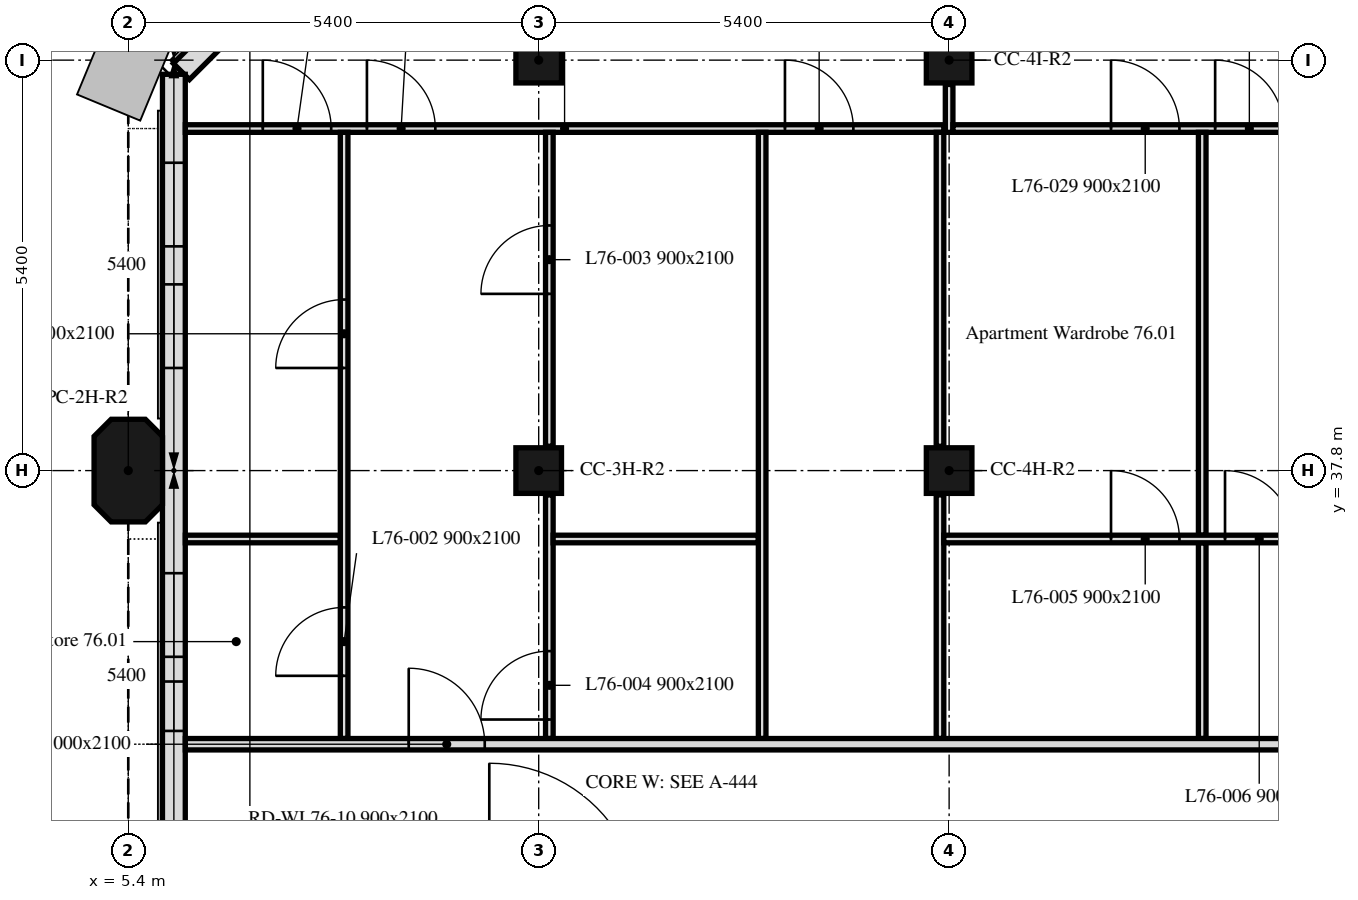
"""IFC4 building model, lengths in metres.
Left out: names, types, materials, properties, quantities, classifications, styles, units other than length and angle.
Written with IfcOpenShell. Run it as: python <this file> out.ifc"""

import sys

from ifc_helpers import new_model, si_unit, direction, frame, frame_2d, origin, origin_2d, place, context, subcontext, project, spatial, polyline, rectangle, outline, extrude, element, fill, save


model = new_model("IFC4")
c1 = context("Model", 3, precision=1e-05, world=origin(), true_north=direction((0.0, 1.0)))
c2 = subcontext(c1, "Body", "Model", "MODEL_VIEW")
j1 = project(units=[si_unit("LENGTHUNIT", "METRE"), si_unit("PLANEANGLEUNIT", "RADIAN")], contexts=[c1])
p1 = place(None, origin())
s1 = spatial("IfcSite", under=j1, at=p1, CompositionType="ELEMENT")
p2 = place(p1, origin())
s2 = spatial("IfcBuilding", under=s1, at=p2, CompositionType="ELEMENT")
p3 = place(p2, frame((0.0, 0.0, 304.9)))
s3 = spatial("IfcBuildingStorey", under=s2, at=p3, CompositionType="ELEMENT", Elevation=304.9)
p4 = place(p3, frame((5.4, 37.8, 0.0), z_axis=(0.0, 0.0, 1.0), x_axis=(0.0, 1.0, 0.0)))
e1 = element("IfcColumn", 1, at=p4, inside=s3, PredefinedType="COLUMN", context=c2, shape_type="SweptSolid", body=[
    extrude(outline(polyline([(-0.45, -0.45), (0.45, -0.45), (0.675, -0.225), (0.675, 0.225), (0.45, 0.45), (-0.45, 0.45), (-0.675, 0.225), (-0.675, -0.225), (-0.45, -0.45)])), origin(), (0.0, 0.0, 1.0), 2.8),
])
for number, where, z_axis, x_axis in (
    (2, (10.8, 37.8, 0.0), (0.0, 0.0, 1.0), (1.0, 0.0, 0.0)),
    (3, (16.2, 37.8, 0.0), (0.0, 0.0, 1.0), (1.0, 0.0, 0.0)),
    (4, (10.8, 43.2, 0.0), (0.0, 0.0, 1.0), (1.0, 0.0, 0.0)),
    (5, (16.2, 43.2, 0.0), (0.0, 0.0, 1.0), (1.0, 0.0, 0.0)),
):
    element("IfcColumn", number, at=place(p3, frame(where, z_axis=z_axis, x_axis=x_axis)), inside=s3, PredefinedType="COLUMN", context=c2, shape_type="SweptSolid", body=[
        extrude(rectangle(XDim=0.6, YDim=0.6, at=origin_2d()), origin(), (0.0, 0.0, 1.0), 2.8),
    ])
p5 = place(p3, frame((10.949, 47.901, 0.0), z_axis=(0.0, 0.0, 1.0), x_axis=(-0.707106781187, -0.707106781187, 0.0)))
e6 = element("IfcWall", 6, at=p5, inside=s3, PredefinedType="SOLIDWALL", context=c2, shape_type="SweptSolid", body=[
    extrude(rectangle(XDim=6.86, YDim=0.3, at=frame_2d((3.43, 0.0))), origin(), (0.0, 0.0, 1.0), 2.8),
])
p6 = place(p5, frame((1.28, 0.0, 0.9)))
e7 = element("IfcOpeningElement", 7, at=p6, cuts=e6, PredefinedType="OPENING", context=c2, shape_type="SweptSolid", body=[
    extrude(rectangle(XDim=1.1, YDim=1.7, at=frame_2d((0.55, 0.85))), frame((0.0, 0.16, 0.0), z_axis=(0.0, -1.0, 0.0), x_axis=(1.0, 0.0, 0.0)), (0.0, 0.0, 1.0), 0.32),
])
p7 = place(p5, frame((4.48, 0.0, 0.9)))
e8 = element("IfcOpeningElement", 8, at=p7, cuts=e6, PredefinedType="OPENING", context=c2, shape_type="SweptSolid", body=[
    extrude(rectangle(XDim=1.1, YDim=1.7, at=frame_2d((0.55, 0.85))), frame((0.0, 0.16, 0.0), z_axis=(0.0, -1.0, 0.0), x_axis=(1.0, 0.0, 0.0)), (0.0, 0.0, 1.0), 0.32),
])
p8 = place(p3, frame((6.0, 43.014, 0.0), z_axis=(0.0, 0.0, 1.0), x_axis=(0.0, -1.0, 0.0)))
e9 = element("IfcWall", 9, at=p8, inside=s3, PredefinedType="SOLIDWALL", context=c2, shape_type="SweptSolid", body=[
    extrude(rectangle(XDim=10.614, YDim=0.3, at=frame_2d((5.307, 0.0))), origin(), (0.0, 0.0, 1.0), 2.8),
])
p9 = place(p8, frame((1.164, 0.0, 0.9)))
e10 = element("IfcOpeningElement", 10, at=p9, cuts=e9, PredefinedType="OPENING", context=c2, shape_type="SweptSolid", body=[
    extrude(rectangle(XDim=1.1, YDim=1.7, at=frame_2d((0.55, 0.85))), frame((0.0, 0.16, 0.0), z_axis=(0.0, -1.0, 0.0), x_axis=(1.0, 0.0, 0.0)), (0.0, 0.0, 1.0), 0.32),
])
p10 = place(p8, frame((2.764, 0.0, 0.9)))
e11 = element("IfcOpeningElement", 11, at=p10, cuts=e9, PredefinedType="OPENING", context=c2, shape_type="SweptSolid", body=[
    extrude(rectangle(XDim=1.1, YDim=1.7, at=frame_2d((0.55, 0.85))), frame((0.0, 0.16, 0.0), z_axis=(0.0, -1.0, 0.0), x_axis=(1.0, 0.0, 0.0)), (0.0, 0.0, 1.0), 0.32),
])
p11 = place(p8, frame((6.564, 0.0, 0.9)))
e12 = element("IfcOpeningElement", 12, at=p11, cuts=e9, PredefinedType="OPENING", context=c2, shape_type="SweptSolid", body=[
    extrude(rectangle(XDim=1.1, YDim=1.7, at=frame_2d((0.55, 0.85))), frame((0.0, 0.16, 0.0), z_axis=(0.0, -1.0, 0.0), x_axis=(1.0, 0.0, 0.0)), (0.0, 0.0, 1.0), 0.32),
])
p12 = place(p8, frame((7.989, 0.0, 0.9)))
e13 = element("IfcOpeningElement", 13, at=p12, cuts=e9, PredefinedType="OPENING", context=c2, shape_type="SweptSolid", body=[
    extrude(rectangle(XDim=0.65, YDim=1.7, at=frame_2d((0.325, 0.85))), frame((0.0, 0.16, 0.0), z_axis=(0.0, -1.0, 0.0), x_axis=(1.0, 0.0, 0.0)), (0.0, 0.0, 1.0), 0.32),
])
p13 = place(p3, frame((6.151, 42.3, 0.0), z_axis=(0.0, 0.0, 1.0), x_axis=(1.0, 0.0, 0.0)))
e14 = element("IfcWall", 14, at=p13, inside=s3, PredefinedType="PARTITIONING", context=c2, shape_type="SweptSolid", body=[
    extrude(rectangle(XDim=9.979, YDim=0.1, at=frame_2d((4.99, 0.0))), origin(), (0.0, 0.0, 1.0), 2.2),
])
p14 = place(p13, frame((7.889, 0.0, 0.0)))
e15 = element("IfcOpeningElement", 15, at=p14, cuts=e14, PredefinedType="OPENING", context=c2, shape_type="SweptSolid", body=[
    extrude(rectangle(XDim=0.9, YDim=2.1, at=frame_2d((0.45, 1.05))), frame((0.0, 0.05, 0.0), z_axis=(0.0, -1.0, 0.0), x_axis=(1.0, 0.0, 0.0)), (0.0, 0.0, 1.0), 0.1),
])
p15 = place(p13, frame((1.019, 0.0, 0.0)))
e16 = element("IfcOpeningElement", 16, at=p15, cuts=e14, PredefinedType="OPENING", context=c2, shape_type="SweptSolid", body=[
    extrude(rectangle(XDim=0.9, YDim=2.1, at=frame_2d((0.45, 1.05))), frame((0.0, 0.05, 0.0), z_axis=(0.0, -1.0, 0.0), x_axis=(1.0, 0.0, 0.0)), (0.0, 0.0, 1.0), 0.1),
])
p16 = place(p13, frame((2.389, 0.0, 0.0)))
e17 = element("IfcOpeningElement", 17, at=p16, cuts=e14, PredefinedType="OPENING", context=c2, shape_type="SweptSolid", body=[
    extrude(rectangle(XDim=0.9, YDim=2.1, at=frame_2d((0.45, 1.05))), frame((0.0, 0.05, 0.0), z_axis=(0.0, -1.0, 0.0), x_axis=(1.0, 0.0, 0.0)), (0.0, 0.0, 1.0), 0.1),
])
p17 = place(p3, frame((16.2, 42.25, 0.0), z_axis=(0.0, 0.0, 1.0), x_axis=(0.0, 1.0, 0.0)))
e18 = element("IfcWall", 18, at=p17, inside=s3, PredefinedType="PARTITIONING", context=c2, shape_type="SweptSolid", body=[
    extrude(rectangle(XDim=0.63, YDim=0.1, at=frame_2d((0.315, 0.0))), origin(), (0.0, 0.0, 1.0), 2.2),
])
p18 = place(p3, frame((16.25, 42.3, 0.0), z_axis=(0.0, 0.0, 1.0), x_axis=(1.0, 0.0, 0.0)))
e19 = element("IfcWall", 19, at=p18, inside=s3, PredefinedType="PARTITIONING", context=c2, shape_type="SweptSolid", body=[
    extrude(rectangle(XDim=5.275, YDim=0.1, at=frame_2d((2.637, 0.0))), origin(), (0.0, 0.0, 1.0), 2.8),
])
p19 = place(p18, frame((2.08, 0.0, 0.0)))
e20 = element("IfcOpeningElement", 20, at=p19, cuts=e19, PredefinedType="OPENING", context=c2, shape_type="SweptSolid", body=[
    extrude(rectangle(XDim=0.9, YDim=2.1, at=frame_2d((0.45, 1.05))), frame((0.0, 0.05, 0.0), z_axis=(0.0, -1.0, 0.0), x_axis=(1.0, 0.0, 0.0)), (0.0, 0.0, 1.0), 0.1),
])
p20 = place(p18, frame((3.45, 0.0, 0.0)))
e21 = element("IfcOpeningElement", 21, at=p20, cuts=e19, PredefinedType="OPENING", context=c2, shape_type="SweptSolid", body=[
    extrude(rectangle(XDim=0.9, YDim=2.1, at=frame_2d((0.45, 1.05))), frame((0.0, 0.05, 0.0), z_axis=(0.0, -1.0, 0.0), x_axis=(1.0, 0.0, 0.0)), (0.0, 0.0, 1.0), 0.1),
])
p21 = place(p3, frame((6.151, 36.9, 0.0), z_axis=(0.0, 0.0, 1.0), x_axis=(1.0, 0.0, 0.0)))
e22 = element("IfcWall", 22, at=p21, inside=s3, PredefinedType="PARTITIONING", context=c2, shape_type="SweptSolid", body=[
    extrude(rectangle(XDim=2.039, YDim=0.1, at=frame_2d((1.02, 0.0))), origin(), (0.0, 0.0, 1.0), 2.8),
])
p22 = place(p3, frame((8.24, 34.275, 0.0), z_axis=(0.0, 0.0, 1.0), x_axis=(0.0, 1.0, 0.0)))
e23 = element("IfcWall", 23, at=p22, inside=s3, PredefinedType="PARTITIONING", context=c2, shape_type="SweptSolid", body=[
    extrude(rectangle(XDim=7.975, YDim=0.1, at=frame_2d((3.988, 0.0))), origin(), (0.0, 0.0, 1.0), 2.2),
])
p23 = place(p22, frame((0.825, 0.0, 0.0)))
e24 = element("IfcOpeningElement", 24, at=p23, cuts=e23, PredefinedType="OPENING", context=c2, shape_type="SweptSolid", body=[
    extrude(rectangle(XDim=0.9, YDim=2.1, at=frame_2d((0.45, 1.05))), frame((0.0, 0.05, 0.0), z_axis=(0.0, -1.0, 0.0), x_axis=(1.0, 0.0, 0.0)), (0.0, 0.0, 1.0), 0.1),
])
p24 = place(p22, frame((4.875, 0.0, 0.0)))
e25 = element("IfcOpeningElement", 25, at=p24, cuts=e23, PredefinedType="OPENING", context=c2, shape_type="SweptSolid", body=[
    extrude(rectangle(XDim=0.9, YDim=2.1, at=frame_2d((0.45, 1.05))), frame((0.0, 0.05, 0.0), z_axis=(0.0, -1.0, 0.0), x_axis=(1.0, 0.0, 0.0)), (0.0, 0.0, 1.0), 0.1),
])
p25 = place(p3, frame((10.94, 34.275, 0.0), z_axis=(0.0, 0.0, 1.0), x_axis=(0.0, 1.0, 0.0)))
e26 = element("IfcWall", 26, at=p25, inside=s3, PredefinedType="PARTITIONING", context=c2, shape_type="SweptSolid", body=[
    extrude(rectangle(XDim=3.205, YDim=0.1, at=frame_2d((1.603, 0.0))), origin(), (0.0, 0.0, 1.0), 2.2),
])
p26 = place(p25, frame((0.25, 0.0, 0.0)))
e27 = element("IfcOpeningElement", 27, at=p26, cuts=e26, PredefinedType="OPENING", context=c2, shape_type="SweptSolid", body=[
    extrude(rectangle(XDim=0.9, YDim=2.1, at=frame_2d((0.45, 1.05))), frame((0.0, 0.05, 0.0), z_axis=(0.0, -1.0, 0.0), x_axis=(1.0, 0.0, 0.0)), (0.0, 0.0, 1.0), 0.1),
])
p27 = place(p3, frame((10.94, 38.12, 0.0), z_axis=(0.0, 0.0, 1.0), x_axis=(0.0, 1.0, 0.0)))
e28 = element("IfcWall", 28, at=p27, inside=s3, PredefinedType="PARTITIONING", context=c2, shape_type="SweptSolid", body=[
    extrude(rectangle(XDim=4.13, YDim=0.1, at=frame_2d((2.065, 0.0))), origin(), (0.0, 0.0, 1.0), 2.2),
])
p28 = place(p27, frame((2.005, 0.0, 0.0)))
e29 = element("IfcOpeningElement", 29, at=p28, cuts=e28, PredefinedType="OPENING", context=c2, shape_type="SweptSolid", body=[
    extrude(rectangle(XDim=0.9, YDim=2.1, at=frame_2d((0.45, 1.05))), frame((0.0, 0.05, 0.0), z_axis=(0.0, -1.0, 0.0), x_axis=(1.0, 0.0, 0.0)), (0.0, 0.0, 1.0), 0.1),
])
p29 = place(p3, frame((10.99, 36.9, 0.0), z_axis=(0.0, 0.0, 1.0), x_axis=(1.0, 0.0, 0.0)))
e30 = element("IfcWall", 30, at=p29, inside=s3, PredefinedType="PARTITIONING", context=c2, shape_type="SweptSolid", body=[
    extrude(rectangle(XDim=2.7, YDim=0.1, at=frame_2d((1.35, 0.0))), origin(), (0.0, 0.0, 1.0), 2.8),
])
p30 = place(p3, frame((13.74, 34.275, 0.0), z_axis=(0.0, 0.0, 1.0), x_axis=(0.0, 1.0, 0.0)))
e31 = element("IfcWall", 31, at=p30, inside=s3, PredefinedType="PARTITIONING", context=c2, shape_type="SweptSolid", body=[
    extrude(rectangle(XDim=7.975, YDim=0.1, at=frame_2d((3.988, 0.0))), origin(), (0.0, 0.0, 1.0), 2.2),
])
p31 = place(p3, frame((16.08, 34.275, 0.0), z_axis=(0.0, 0.0, 1.0), x_axis=(0.0, 1.0, 0.0)))
e32 = element("IfcWall", 32, at=p31, inside=s3, PredefinedType="PARTITIONING", context=c2, shape_type="SweptSolid", body=[
    extrude(rectangle(XDim=3.205, YDim=0.1, at=frame_2d((1.603, 0.0))), origin(), (0.0, 0.0, 1.0), 2.2),
])
p32 = place(p3, frame((16.08, 38.12, 0.0), z_axis=(0.0, 0.0, 1.0), x_axis=(0.0, 1.0, 0.0)))
e33 = element("IfcWall", 33, at=p32, inside=s3, PredefinedType="PARTITIONING", context=c2, shape_type="SweptSolid", body=[
    extrude(rectangle(XDim=4.13, YDim=0.1, at=frame_2d((2.065, 0.0))), origin(), (0.0, 0.0, 1.0), 2.2),
])
p33 = place(p3, frame((19.53, 36.95, 0.0), z_axis=(0.0, 0.0, 1.0), x_axis=(0.0, 1.0, 0.0)))
e34 = element("IfcWall", 34, at=p33, inside=s3, PredefinedType="PARTITIONING", context=c2, shape_type="SweptSolid", body=[
    extrude(rectangle(XDim=5.3, YDim=0.1, at=frame_2d((2.65, 0.0))), origin(), (0.0, 0.0, 1.0), 2.8),
])
p34 = place(p3, frame((19.53, 34.275, 0.0), z_axis=(0.0, 0.0, 1.0), x_axis=(0.0, 1.0, 0.0)))
e35 = element("IfcWall", 35, at=p34, inside=s3, PredefinedType="PARTITIONING", context=c2, shape_type="SweptSolid", body=[
    extrude(rectangle(XDim=2.575, YDim=0.1, at=frame_2d((1.288, 0.0))), origin(), (0.0, 0.0, 1.0), 2.8),
])
p35 = place(p3, frame((16.13, 36.9, 0.0), z_axis=(0.0, 0.0, 1.0), x_axis=(1.0, 0.0, 0.0)))
e36 = element("IfcWall", 36, at=p35, inside=s3, PredefinedType="PARTITIONING", context=c2, shape_type="SweptSolid", body=[
    extrude(rectangle(XDim=5.395, YDim=0.1, at=frame_2d((2.698, 0.0))), origin(), (0.0, 0.0, 1.0), 2.8),
])
p36 = place(p35, frame((2.2, 0.0, 0.0)))
e37 = element("IfcOpeningElement", 37, at=p36, cuts=e36, PredefinedType="OPENING", context=c2, shape_type="SweptSolid", body=[
    extrude(rectangle(XDim=0.9, YDim=2.1, at=frame_2d((0.45, 1.05))), frame((0.0, 0.05, 0.0), z_axis=(0.0, -1.0, 0.0), x_axis=(1.0, 0.0, 0.0)), (0.0, 0.0, 1.0), 0.1),
])
p37 = place(p35, frame((3.7, 0.0, 0.0)))
e38 = element("IfcOpeningElement", 38, at=p37, cuts=e36, PredefinedType="OPENING", context=c2, shape_type="SweptSolid", body=[
    extrude(rectangle(XDim=0.9, YDim=2.1, at=frame_2d((0.45, 1.05))), frame((0.0, 0.05, 0.0), z_axis=(0.0, -1.0, 0.0), x_axis=(1.0, 0.0, 0.0)), (0.0, 0.0, 1.0), 0.1),
])
p38 = place(p3, frame((6.151, 34.2, 0.0), z_axis=(0.0, 0.0, 1.0), x_axis=(1.0, 0.0, 0.0)))
e39 = element("IfcWall", 39, at=p38, inside=s3, PredefinedType="PARTITIONING", context=c2, shape_type="SweptSolid", body=[
    extrude(rectangle(XDim=41.698, YDim=0.15, at=frame_2d((20.849, 0.0))), origin(), (0.0, 0.0, 1.0), 2.2),
])
p39 = place(p38, frame((2.939, 0.0, 0.0)))
e40 = element("IfcOpeningElement", 40, at=p39, cuts=e39, PredefinedType="OPENING", context=c2, shape_type="SweptSolid", body=[
    extrude(rectangle(XDim=1.0, YDim=2.1, at=frame_2d((0.5, 1.05))), frame((0.0, 0.075, 0.0), z_axis=(0.0, -1.0, 0.0), x_axis=(1.0, 0.0, 0.0)), (0.0, 0.0, 1.0), 0.15),
])
p40 = place(p38, frame((18.121, 0.0, 0.0)))
e41 = element("IfcOpeningElement", 41, at=p40, cuts=e39, PredefinedType="OPENING", context=c2, shape_type="SweptSolid", body=[
    extrude(rectangle(XDim=1.0, YDim=2.1, at=frame_2d((0.5, 1.05))), frame((0.0, 0.075, 0.0), z_axis=(0.0, -1.0, 0.0), x_axis=(1.0, 0.0, 0.0)), (0.0, 0.0, 1.0), 0.15),
])
p41 = place(p38, frame((32.359, 0.0, 0.0)))
e42 = element("IfcOpeningElement", 42, at=p41, cuts=e39, PredefinedType="OPENING", context=c2, shape_type="SweptSolid", body=[
    extrude(rectangle(XDim=1.0, YDim=2.1, at=frame_2d((0.5, 1.05))), frame((0.0, 0.075, 0.0), z_axis=(0.0, -1.0, 0.0), x_axis=(1.0, 0.0, 0.0)), (0.0, 0.0, 1.0), 0.15),
])
p42 = place(p9, origin())
e43 = element("IfcWindow", 43, at=p42, inside=s3, PartitioningType="SINGLE_PANEL", PredefinedType="WINDOW", context=c2, shape_type="SweptSolid", body=[
    extrude(rectangle(XDim=1.1, YDim=1.7, at=frame_2d((0.55, 0.85))), frame((0.0, 0.03, 0.0), z_axis=(0.0, -1.0, 0.0), x_axis=(1.0, 0.0, 0.0)), (0.0, 0.0, 1.0), 0.06),
])
fill(e10, e43)
p43 = place(p10, origin())
e44 = element("IfcWindow", 44, at=p43, inside=s3, PartitioningType="SINGLE_PANEL", PredefinedType="WINDOW", context=c2, shape_type="SweptSolid", body=[
    extrude(rectangle(XDim=1.1, YDim=1.7, at=frame_2d((0.55, 0.85))), frame((0.0, 0.03, 0.0), z_axis=(0.0, -1.0, 0.0), x_axis=(1.0, 0.0, 0.0)), (0.0, 0.0, 1.0), 0.06),
])
fill(e11, e44)
p44 = place(p11, origin())
e45 = element("IfcWindow", 45, at=p44, inside=s3, PartitioningType="SINGLE_PANEL", PredefinedType="WINDOW", context=c2, shape_type="SweptSolid", body=[
    extrude(rectangle(XDim=1.1, YDim=1.7, at=frame_2d((0.55, 0.85))), frame((0.0, 0.03, 0.0), z_axis=(0.0, -1.0, 0.0), x_axis=(1.0, 0.0, 0.0)), (0.0, 0.0, 1.0), 0.06),
])
fill(e12, e45)
p45 = place(p12, origin())
e46 = element("IfcWindow", 46, at=p45, inside=s3, PartitioningType="SINGLE_PANEL", PredefinedType="WINDOW", context=c2, shape_type="SweptSolid", body=[
    extrude(rectangle(XDim=0.65, YDim=1.7, at=frame_2d((0.325, 0.85))), frame((0.0, 0.03, 0.0), z_axis=(0.0, -1.0, 0.0), x_axis=(1.0, 0.0, 0.0)), (0.0, 0.0, 1.0), 0.06),
])
fill(e13, e46)
p46 = place(p14, origin())
e47 = element("IfcDoor", 47, at=p46, inside=s3, OperationType="SINGLE_SWING_LEFT", PredefinedType="DOOR", context=c2, shape_type="SweptSolid", body=[
    extrude(rectangle(XDim=0.9, YDim=2.1, at=frame_2d((0.45, 1.05))), frame((0.0, 0.025, 0.0), z_axis=(0.0, -1.0, 0.0), x_axis=(1.0, 0.0, 0.0)), (0.0, 0.0, 1.0), 0.05),
])
fill(e15, e47)
p47 = place(p23, origin())
e48 = element("IfcDoor", 48, at=p47, inside=s3, OperationType="SINGLE_SWING_LEFT", PredefinedType="DOOR", context=c2, shape_type="SweptSolid", body=[
    extrude(rectangle(XDim=0.9, YDim=2.1, at=frame_2d((0.45, 1.05))), frame((0.0, 0.025, 0.0), z_axis=(0.0, -1.0, 0.0), x_axis=(1.0, 0.0, 0.0)), (0.0, 0.0, 1.0), 0.05),
])
fill(e24, e48)
p48 = place(p28, origin())
e49 = element("IfcDoor", 49, at=p48, inside=s3, OperationType="SINGLE_SWING_RIGHT", PredefinedType="DOOR", context=c2, shape_type="SweptSolid", body=[
    extrude(rectangle(XDim=0.9, YDim=2.1, at=frame_2d((0.45, 1.05))), frame((0.0, 0.025, 0.0), z_axis=(0.0, -1.0, 0.0), x_axis=(1.0, 0.0, 0.0)), (0.0, 0.0, 1.0), 0.05),
])
fill(e29, e49)
p49 = place(p26, origin())
e50 = element("IfcDoor", 50, at=p49, inside=s3, OperationType="SINGLE_SWING_RIGHT", PredefinedType="DOOR", context=c2, shape_type="SweptSolid", body=[
    extrude(rectangle(XDim=0.9, YDim=2.1, at=frame_2d((0.45, 1.05))), frame((0.0, 0.025, 0.0), z_axis=(0.0, -1.0, 0.0), x_axis=(1.0, 0.0, 0.0)), (0.0, 0.0, 1.0), 0.05),
])
fill(e27, e50)
p50 = place(p36, origin())
e51 = element("IfcDoor", 51, at=p50, inside=s3, OperationType="SINGLE_SWING_LEFT", PredefinedType="DOOR", context=c2, shape_type="SweptSolid", body=[
    extrude(rectangle(XDim=0.9, YDim=2.1, at=frame_2d((0.45, 1.05))), frame((0.0, 0.025, 0.0), z_axis=(0.0, -1.0, 0.0), x_axis=(1.0, 0.0, 0.0)), (0.0, 0.0, 1.0), 0.05),
])
fill(e37, e51)
p51 = place(p37, origin())
e52 = element("IfcDoor", 52, at=p51, inside=s3, OperationType="SINGLE_SWING_LEFT", PredefinedType="DOOR", context=c2, shape_type="SweptSolid", body=[
    extrude(rectangle(XDim=0.9, YDim=2.1, at=frame_2d((0.45, 1.05))), frame((0.0, 0.025, 0.0), z_axis=(0.0, -1.0, 0.0), x_axis=(1.0, 0.0, 0.0)), (0.0, 0.0, 1.0), 0.05),
])
fill(e38, e52)
p52 = place(p15, origin())
e53 = element("IfcDoor", 53, at=p52, inside=s3, OperationType="SINGLE_SWING_RIGHT", PredefinedType="DOOR", context=c2, shape_type="SweptSolid", body=[
    extrude(rectangle(XDim=0.9, YDim=2.1, at=frame_2d((0.45, 1.05))), frame((0.0, 0.025, 0.0), z_axis=(0.0, -1.0, 0.0), x_axis=(1.0, 0.0, 0.0)), (0.0, 0.0, 1.0), 0.05),
])
fill(e16, e53)
p53 = place(p19, origin())
e54 = element("IfcDoor", 54, at=p53, inside=s3, OperationType="SINGLE_SWING_RIGHT", PredefinedType="DOOR", context=c2, shape_type="SweptSolid", body=[
    extrude(rectangle(XDim=0.9, YDim=2.1, at=frame_2d((0.45, 1.05))), frame((0.0, 0.025, 0.0), z_axis=(0.0, -1.0, 0.0), x_axis=(1.0, 0.0, 0.0)), (0.0, 0.0, 1.0), 0.05),
])
fill(e20, e54)
p54 = place(p20, origin())
e55 = element("IfcDoor", 55, at=p54, inside=s3, OperationType="SINGLE_SWING_LEFT", PredefinedType="DOOR", context=c2, shape_type="SweptSolid", body=[
    extrude(rectangle(XDim=0.9, YDim=2.1, at=frame_2d((0.45, 1.05))), frame((0.0, 0.025, 0.0), z_axis=(0.0, -1.0, 0.0), x_axis=(1.0, 0.0, 0.0)), (0.0, 0.0, 1.0), 0.05),
])
fill(e21, e55)
p55 = place(p24, origin())
e56 = element("IfcDoor", 56, at=p55, inside=s3, OperationType="SINGLE_SWING_RIGHT", PredefinedType="DOOR", context=c2, shape_type="SweptSolid", body=[
    extrude(rectangle(XDim=0.9, YDim=2.1, at=frame_2d((0.45, 1.05))), frame((0.0, 0.025, 0.0), z_axis=(0.0, -1.0, 0.0), x_axis=(1.0, 0.0, 0.0)), (0.0, 0.0, 1.0), 0.05),
])
fill(e25, e56)
p56 = place(p16, origin())
e57 = element("IfcDoor", 57, at=p56, inside=s3, OperationType="SINGLE_SWING_LEFT", PredefinedType="DOOR", context=c2, shape_type="SweptSolid", body=[
    extrude(rectangle(XDim=0.9, YDim=2.1, at=frame_2d((0.45, 1.05))), frame((0.0, 0.025, 0.0), z_axis=(0.0, -1.0, 0.0), x_axis=(1.0, 0.0, 0.0)), (0.0, 0.0, 1.0), 0.05),
])
fill(e17, e57)
p57 = place(p39, origin())
e58 = element("IfcDoor", 58, at=p57, inside=s3, OperationType="SINGLE_SWING_LEFT", PredefinedType="DOOR", context=c2, shape_type="SweptSolid", body=[
    extrude(rectangle(XDim=1.0, YDim=2.1, at=frame_2d((0.5, 1.05))), frame((0.0, 0.025, 0.0), z_axis=(0.0, -1.0, 0.0), x_axis=(1.0, 0.0, 0.0)), (0.0, 0.0, 1.0), 0.05),
])
fill(e40, e58)
save(model, sys.argv[1])
